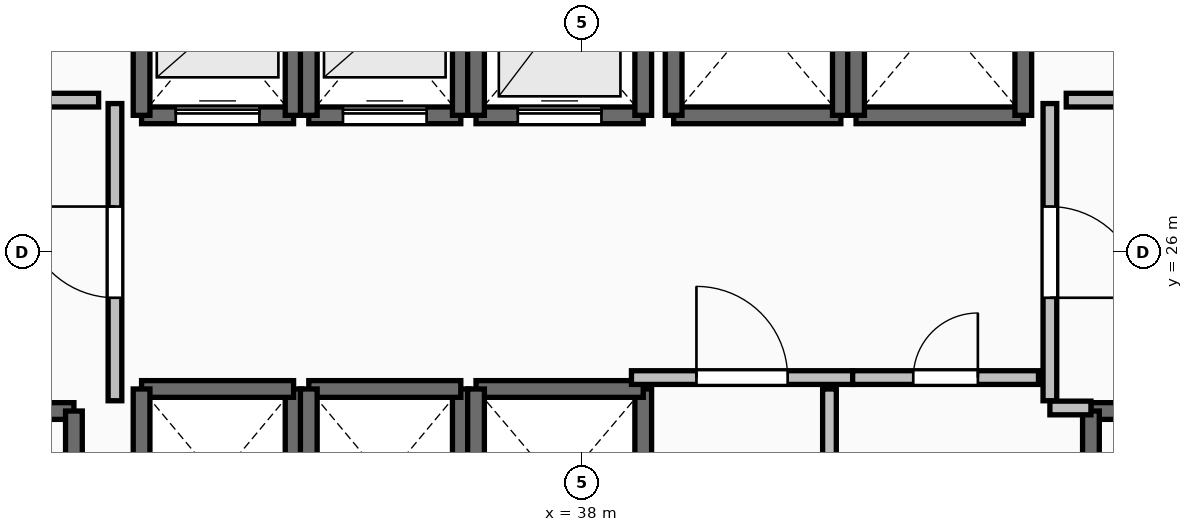
"""IFC4 building model, lengths in metres.
Left out: names, types, materials, properties, quantities, classifications, styles, units other than length and angle.
Written with IfcOpenShell. Run it as: python <this file> out.ifc"""

import sys

from ifc_helpers import new_model, si_unit, direction, frame, frame_2d, origin, place, context, subcontext, project, spatial, rectangle, extrude, element, fill, save


model = new_model("IFC4")
c1 = context("Model", 3, precision=1e-05, world=origin(), true_north=direction((0.0, 1.0)))
c2 = subcontext(c1, "Body", "Model", "MODEL_VIEW")
j1 = project(units=[si_unit("LENGTHUNIT", "METRE"), si_unit("PLANEANGLEUNIT", "RADIAN")], contexts=[c1])
p1 = place(None, origin())
s1 = spatial("IfcSite", under=j1, at=p1, CompositionType="ELEMENT")
p2 = place(p1, origin())
s2 = spatial("IfcBuilding", under=s1, at=p2, CompositionType="ELEMENT")
p3 = place(p2, frame((0.0, 0.0, 38.0)))
s3 = spatial("IfcBuildingStorey", under=s2, at=p3, CompositionType="ELEMENT", Elevation=38.0)
p4 = place(p3, frame((27.94, 23.91, 0.0), z_axis=(0.0, 0.0, 1.0), x_axis=(1.0, 0.0, 0.0)))
e1 = element("IfcWall", 1, at=p4, inside=s3, PredefinedType="SOLIDWALL", context=c2, shape_type="SweptSolid", body=[
    extrude(rectangle(XDim=3.37, YDim=0.22, at=frame_2d((1.685, 0.0))), origin(), (0.0, 0.0, 1.0), 3.24),
])
p5 = place(p4, frame((1.135, 0.0, 0.0)))
e2 = element("IfcOpeningElement", 2, at=p5, cuts=e1, PredefinedType="OPENING", context=c2, shape_type="SweptSolid", body=[
    extrude(rectangle(XDim=1.1, YDim=2.15, at=frame_2d((0.55, 1.075))), frame((0.0, 0.125, 0.0), z_axis=(0.0, -1.0, 0.0), x_axis=(1.0, 0.0, 0.0)), (0.0, 0.0, 1.0), 0.25),
])
p6 = place(p3, frame((31.31, 23.91, 0.0), z_axis=(0.0, 0.0, 1.0), x_axis=(0.0, -1.0, 0.0)))
e3 = element("IfcWall", 3, at=p6, inside=s3, PredefinedType="SOLIDWALL", context=c2, shape_type="SweptSolid", body=[
    extrude(rectangle(XDim=7.42, YDim=0.22, at=frame_2d((3.71, 0.0))), origin(), (0.0, 0.0, 1.0), 3.24),
])
p7 = place(p3, frame((44.69, 23.91, 0.0), z_axis=(0.0, 0.0, 1.0), x_axis=(1.0, 0.0, 0.0)))
e4 = element("IfcWall", 4, at=p7, inside=s3, PredefinedType="SOLIDWALL", context=c2, shape_type="SweptSolid", body=[
    extrude(rectangle(XDim=3.37, YDim=0.22, at=frame_2d((1.685, 0.0))), origin(), (0.0, 0.0, 1.0), 3.24),
])
p8 = place(p7, frame((1.135, 0.0, 0.0)))
e5 = element("IfcOpeningElement", 5, at=p8, cuts=e4, PredefinedType="OPENING", context=c2, shape_type="SweptSolid", body=[
    extrude(rectangle(XDim=1.1, YDim=2.15, at=frame_2d((0.55, 1.075))), frame((0.0, 0.125, 0.0), z_axis=(0.0, -1.0, 0.0), x_axis=(1.0, 0.0, 0.0)), (0.0, 0.0, 1.0), 0.25),
])
p9 = place(p3, frame((44.69, 16.49, 0.0), z_axis=(0.0, 0.0, 1.0), x_axis=(0.0, 1.0, 0.0)))
e6 = element("IfcWall", 6, at=p9, inside=s3, PredefinedType="SOLIDWALL", context=c2, shape_type="SweptSolid", body=[
    extrude(rectangle(XDim=7.42, YDim=0.22, at=frame_2d((3.71, 0.0))), origin(), (0.0, 0.0, 1.0), 3.24),
])
p10 = place(p3, frame((32.2, 27.8, 0.0), z_axis=(0.0, 0.0, 1.0), x_axis=(1.0, 0.0, 0.0)))
e7 = element("IfcWall", 7, at=p10, inside=s3, PredefinedType="SOLIDWALL", context=c2, shape_type="SweptSolid", body=[
    extrude(rectangle(XDim=2.0, YDim=0.22, at=frame_2d((1.0, 0.0))), origin(), (0.0, 0.0, 1.0), 3.24),
])
p11 = place(p10, frame((0.45, 0.0, 0.0)))
e8 = element("IfcOpeningElement", 8, at=p11, cuts=e7, PredefinedType="OPENING", context=c2, shape_type="SweptSolid", body=[
    extrude(rectangle(XDim=1.1, YDim=2.2, at=frame_2d((0.55, 1.1))), frame((0.0, 0.125, 0.0), z_axis=(0.0, -1.0, 0.0), x_axis=(1.0, 0.0, 0.0)), (0.0, 0.0, 1.0), 0.25),
])
for number, where, z_axis, x_axis in (
    (9, (34.2, 27.8, 0.0), (0.0, 0.0, 1.0), (0.0, 1.0, 0.0)),
    (10, (32.2, 30.2, 0.0), (0.0, 0.0, 1.0), (0.0, -1.0, 0.0)),
):
    element("IfcWall", number, at=place(p3, frame(where, z_axis=z_axis, x_axis=x_axis)), inside=s3, PredefinedType="SOLIDWALL", context=c2, shape_type="SweptSolid", body=[
        extrude(rectangle(XDim=2.4, YDim=0.22, at=frame_2d((1.2, 0.0))), origin(), (0.0, 0.0, 1.0), 3.24),
    ])
p12 = place(p3, frame((34.4, 27.8, 0.0), z_axis=(0.0, 0.0, 1.0), x_axis=(1.0, 0.0, 0.0)))
e11 = element("IfcWall", 11, at=p12, inside=s3, PredefinedType="SOLIDWALL", context=c2, shape_type="SweptSolid", body=[
    extrude(rectangle(XDim=2.0, YDim=0.22, at=frame_2d((1.0, 0.0))), origin(), (0.0, 0.0, 1.0), 3.24),
])
p13 = place(p12, frame((0.45, 0.0, 0.0)))
e12 = element("IfcOpeningElement", 12, at=p13, cuts=e11, PredefinedType="OPENING", context=c2, shape_type="SweptSolid", body=[
    extrude(rectangle(XDim=1.1, YDim=2.2, at=frame_2d((0.55, 1.1))), frame((0.0, 0.125, 0.0), z_axis=(0.0, -1.0, 0.0), x_axis=(1.0, 0.0, 0.0)), (0.0, 0.0, 1.0), 0.25),
])
for number, where, z_axis, x_axis in (
    (13, (36.4, 27.8, 0.0), (0.0, 0.0, 1.0), (0.0, 1.0, 0.0)),
    (14, (34.4, 30.2, 0.0), (0.0, 0.0, 1.0), (0.0, -1.0, 0.0)),
):
    element("IfcWall", number, at=place(p3, frame(where, z_axis=z_axis, x_axis=x_axis)), inside=s3, PredefinedType="SOLIDWALL", context=c2, shape_type="SweptSolid", body=[
        extrude(rectangle(XDim=2.4, YDim=0.22, at=frame_2d((1.2, 0.0))), origin(), (0.0, 0.0, 1.0), 3.24),
    ])
p14 = place(p3, frame((36.6, 27.8, 0.0), z_axis=(0.0, 0.0, 1.0), x_axis=(1.0, 0.0, 0.0)))
e15 = element("IfcWall", 15, at=p14, inside=s3, PredefinedType="SOLIDWALL", context=c2, shape_type="SweptSolid", body=[
    extrude(rectangle(XDim=2.2, YDim=0.22, at=frame_2d((1.1, 0.0))), origin(), (0.0, 0.0, 1.0), 3.24),
])
p15 = place(p14, frame((0.55, 0.0, 0.0)))
e16 = element("IfcOpeningElement", 16, at=p15, cuts=e15, PredefinedType="OPENING", context=c2, shape_type="SweptSolid", body=[
    extrude(rectangle(XDim=1.1, YDim=2.2, at=frame_2d((0.55, 1.1))), frame((0.0, 0.125, 0.0), z_axis=(0.0, -1.0, 0.0), x_axis=(1.0, 0.0, 0.0)), (0.0, 0.0, 1.0), 0.25),
])
for number, where, z_axis, x_axis in (
    (17, (38.8, 27.8, 0.0), (0.0, 0.0, 1.0), (0.0, 1.0, 0.0)),
    (18, (36.6, 30.4, 0.0), (0.0, 0.0, 1.0), (0.0, -1.0, 0.0)),
):
    element("IfcWall", number, at=place(p3, frame(where, z_axis=z_axis, x_axis=x_axis)), inside=s3, PredefinedType="SOLIDWALL", context=c2, shape_type="SweptSolid", body=[
        extrude(rectangle(XDim=2.6, YDim=0.22, at=frame_2d((1.3, 0.0))), origin(), (0.0, 0.0, 1.0), 3.24),
    ])
p16 = place(p3, frame((34.2, 21.8, 0.0), z_axis=(0.0, 0.0, 1.0), x_axis=(0.0, 1.0, 0.0)))
e19 = element("IfcWall", 19, at=p16, inside=s3, PredefinedType="SOLIDWALL", context=c2, shape_type="SweptSolid", body=[
    extrude(rectangle(XDim=2.4, YDim=0.22, at=frame_2d((1.2, 0.0))), origin(), (0.0, 0.0, 1.0), 3.24),
])
p17 = place(p3, frame((34.2, 24.2, 0.0), z_axis=(0.0, 0.0, 1.0), x_axis=(-1.0, 0.0, 0.0)))
e20 = element("IfcWall", 20, at=p17, inside=s3, PredefinedType="SOLIDWALL", context=c2, shape_type="SweptSolid", body=[
    extrude(rectangle(XDim=2.0, YDim=0.22, at=frame_2d((1.0, 0.0))), origin(), (0.0, 0.0, 1.0), 3.24),
])
for number, where, z_axis, x_axis in (
    (21, (32.2, 24.2, 0.0), (0.0, 0.0, 1.0), (0.0, -1.0, 0.0)),
    (22, (36.4, 21.8, 0.0), (0.0, 0.0, 1.0), (0.0, 1.0, 0.0)),
):
    element("IfcWall", number, at=place(p3, frame(where, z_axis=z_axis, x_axis=x_axis)), inside=s3, PredefinedType="SOLIDWALL", context=c2, shape_type="SweptSolid", body=[
        extrude(rectangle(XDim=2.4, YDim=0.22, at=frame_2d((1.2, 0.0))), origin(), (0.0, 0.0, 1.0), 3.24),
    ])
p18 = place(p3, frame((36.4, 24.2, 0.0), z_axis=(0.0, 0.0, 1.0), x_axis=(-1.0, 0.0, 0.0)))
e23 = element("IfcWall", 23, at=p18, inside=s3, PredefinedType="SOLIDWALL", context=c2, shape_type="SweptSolid", body=[
    extrude(rectangle(XDim=2.0, YDim=0.22, at=frame_2d((1.0, 0.0))), origin(), (0.0, 0.0, 1.0), 3.24),
])
p19 = place(p3, frame((34.4, 24.2, 0.0), z_axis=(0.0, 0.0, 1.0), x_axis=(0.0, -1.0, 0.0)))
e24 = element("IfcWall", 24, at=p19, inside=s3, PredefinedType="SOLIDWALL", context=c2, shape_type="SweptSolid", body=[
    extrude(rectangle(XDim=2.4, YDim=0.22, at=frame_2d((1.2, 0.0))), origin(), (0.0, 0.0, 1.0), 3.24),
])
p20 = place(p3, frame((38.8, 21.6, 0.0), z_axis=(0.0, 0.0, 1.0), x_axis=(0.0, 1.0, 0.0)))
e25 = element("IfcWall", 25, at=p20, inside=s3, PredefinedType="SOLIDWALL", context=c2, shape_type="SweptSolid", body=[
    extrude(rectangle(XDim=2.6, YDim=0.22, at=frame_2d((1.3, 0.0))), origin(), (0.0, 0.0, 1.0), 3.24),
])
p21 = place(p3, frame((38.8, 24.2, 0.0), z_axis=(0.0, 0.0, 1.0), x_axis=(-1.0, 0.0, 0.0)))
e26 = element("IfcWall", 26, at=p21, inside=s3, PredefinedType="SOLIDWALL", context=c2, shape_type="SweptSolid", body=[
    extrude(rectangle(XDim=2.2, YDim=0.22, at=frame_2d((1.1, 0.0))), origin(), (0.0, 0.0, 1.0), 3.24),
])
p22 = place(p3, frame((36.6, 24.2, 0.0), z_axis=(0.0, 0.0, 1.0), x_axis=(0.0, -1.0, 0.0)))
e27 = element("IfcWall", 27, at=p22, inside=s3, PredefinedType="SOLIDWALL", context=c2, shape_type="SweptSolid", body=[
    extrude(rectangle(XDim=2.6, YDim=0.22, at=frame_2d((1.3, 0.0))), origin(), (0.0, 0.0, 1.0), 3.24),
])
p23 = place(p3, frame((39.2, 27.8, 0.0), z_axis=(0.0, 0.0, 1.0), x_axis=(1.0, 0.0, 0.0)))
e28 = element("IfcWall", 28, at=p23, inside=s3, PredefinedType="SOLIDWALL", context=c2, shape_type="SweptSolid", body=[
    extrude(rectangle(XDim=2.2, YDim=0.22, at=frame_2d((1.1, 0.0))), origin(), (0.0, 0.0, 1.0), 3.24),
])
for number, where, z_axis, x_axis in (
    (29, (41.4, 27.8, 0.0), (0.0, 0.0, 1.0), (0.0, 1.0, 0.0)),
    (30, (39.2, 30.4, 0.0), (0.0, 0.0, 1.0), (0.0, -1.0, 0.0)),
):
    element("IfcWall", number, at=place(p3, frame(where, z_axis=z_axis, x_axis=x_axis)), inside=s3, PredefinedType="SOLIDWALL", context=c2, shape_type="SweptSolid", body=[
        extrude(rectangle(XDim=2.6, YDim=0.22, at=frame_2d((1.3, 0.0))), origin(), (0.0, 0.0, 1.0), 3.24),
    ])
p24 = place(p3, frame((41.6, 27.8, 0.0), z_axis=(0.0, 0.0, 1.0), x_axis=(1.0, 0.0, 0.0)))
e31 = element("IfcWall", 31, at=p24, inside=s3, PredefinedType="SOLIDWALL", context=c2, shape_type="SweptSolid", body=[
    extrude(rectangle(XDim=2.2, YDim=0.22, at=frame_2d((1.1, 0.0))), origin(), (0.0, 0.0, 1.0), 3.24),
])
for number, where, z_axis, x_axis in (
    (32, (43.8, 27.8, 0.0), (0.0, 0.0, 1.0), (0.0, 1.0, 0.0)),
    (33, (41.6, 30.4, 0.0), (0.0, 0.0, 1.0), (0.0, -1.0, 0.0)),
):
    element("IfcWall", number, at=place(p3, frame(where, z_axis=z_axis, x_axis=x_axis)), inside=s3, PredefinedType="SOLIDWALL", context=c2, shape_type="SweptSolid", body=[
        extrude(rectangle(XDim=2.6, YDim=0.22, at=frame_2d((1.3, 0.0))), origin(), (0.0, 0.0, 1.0), 3.24),
    ])
p25 = place(p3, frame((31.85, 24.045, 0.0), z_axis=(0.0, 0.0, 1.0), x_axis=(0.0, 1.0, 0.0)))
e34 = element("IfcWall", 34, at=p25, inside=s3, PredefinedType="PARTITIONING", context=c2, shape_type="SweptSolid", body=[
    extrude(rectangle(XDim=3.91, YDim=0.18, at=frame_2d((1.955, 0.0))), origin(), (0.0, 0.0, 1.0), 3.24),
])
p26 = place(p25, frame((1.355, 0.0, 0.0)))
e35 = element("IfcOpeningElement", 35, at=p26, cuts=e34, PredefinedType="OPENING", context=c2, shape_type="SweptSolid", body=[
    extrude(rectangle(XDim=1.2, YDim=2.15, at=frame_2d((0.6, 1.075))), frame((0.0, 0.105, 0.0), z_axis=(0.0, -1.0, 0.0), x_axis=(1.0, 0.0, 0.0)), (0.0, 0.0, 1.0), 0.21),
])
p27 = place(p3, frame((44.15, 27.955, 0.0), z_axis=(0.0, 0.0, 1.0), x_axis=(0.0, -1.0, 0.0)))
e36 = element("IfcWall", 36, at=p27, inside=s3, PredefinedType="PARTITIONING", context=c2, shape_type="SweptSolid", body=[
    extrude(rectangle(XDim=3.91, YDim=0.18, at=frame_2d((1.955, 0.0))), origin(), (0.0, 0.0, 1.0), 3.24),
])
p28 = place(p27, frame((1.355, 0.0, 0.0)))
e37 = element("IfcOpeningElement", 37, at=p28, cuts=e36, PredefinedType="OPENING", context=c2, shape_type="SweptSolid", body=[
    extrude(rectangle(XDim=1.2, YDim=2.15, at=frame_2d((0.6, 1.075))), frame((0.0, 0.105, 0.0), z_axis=(0.0, -1.0, 0.0), x_axis=(1.0, 0.0, 0.0)), (0.0, 0.0, 1.0), 0.21),
])
p29 = place(p3, frame((44.15, 23.95, 0.0), z_axis=(0.0, 0.0, 1.0), x_axis=(1.0, 0.0, 0.0)))
e38 = element("IfcWall", 38, at=p29, inside=s3, PredefinedType="PARTITIONING", context=c2, shape_type="SweptSolid", body=[
    extrude(rectangle(XDim=0.54, YDim=0.18, at=frame_2d((0.27, 0.0))), origin(), (0.0, 0.0, 1.0), 3.24),
])
p30 = place(p3, frame((38.645, 24.35, 0.0), z_axis=(0.0, 0.0, 1.0), x_axis=(1.0, 0.0, 0.0)))
e39 = element("IfcWall", 39, at=p30, inside=s3, PredefinedType="PARTITIONING", context=c2, shape_type="SweptSolid", body=[
    extrude(rectangle(XDim=2.91, YDim=0.18, at=frame_2d((1.455, 0.0))), origin(), (0.0, 0.0, 1.0), 3.24),
])
p31 = place(p30, frame((0.855, 0.0, 0.0)))
e40 = element("IfcOpeningElement", 40, at=p31, cuts=e39, PredefinedType="OPENING", context=c2, shape_type="SweptSolid", body=[
    extrude(rectangle(XDim=1.2, YDim=2.15, at=frame_2d((0.6, 1.075))), frame((0.0, 0.105, 0.0), z_axis=(0.0, -1.0, 0.0), x_axis=(1.0, 0.0, 0.0)), (0.0, 0.0, 1.0), 0.21),
])
p32 = place(p3, frame((41.555, 24.35, 0.0), z_axis=(0.0, 0.0, 1.0), x_axis=(1.0, 0.0, 0.0)))
e41 = element("IfcWall", 41, at=p32, inside=s3, PredefinedType="PARTITIONING", context=c2, shape_type="SweptSolid", body=[
    extrude(rectangle(XDim=2.445, YDim=0.18, at=frame_2d((1.223, 0.0))), origin(), (0.0, 0.0, 1.0), 3.24),
])
p33 = place(p32, frame((0.798, 0.0, 0.0)))
e42 = element("IfcOpeningElement", 42, at=p33, cuts=e41, PredefinedType="OPENING", context=c2, shape_type="SweptSolid", body=[
    extrude(rectangle(XDim=0.85, YDim=2.1, at=frame_2d((0.425, 1.05))), frame((0.0, 0.105, 0.0), z_axis=(0.0, -1.0, 0.0), x_axis=(1.0, 0.0, 0.0)), (0.0, 0.0, 1.0), 0.21),
])
p34 = place(p3, frame((41.25, 20.305, 0.0), z_axis=(0.0, 0.0, 1.0), x_axis=(0.0, 1.0, 0.0)))
e43 = element("IfcWall", 43, at=p34, inside=s3, PredefinedType="PARTITIONING", context=c2, shape_type="SweptSolid", body=[
    extrude(rectangle(XDim=3.895, YDim=0.18, at=frame_2d((1.948, 0.0))), origin(), (0.0, 0.0, 1.0), 3.24),
])
p35 = place(p34, frame((1.522, 0.0, 0.0)))
e44 = element("IfcOpeningElement", 44, at=p35, cuts=e43, PredefinedType="OPENING", context=c2, shape_type="SweptSolid", body=[
    extrude(rectangle(XDim=0.85, YDim=2.1, at=frame_2d((0.425, 1.05))), frame((0.0, 0.105, 0.0), z_axis=(0.0, -1.0, 0.0), x_axis=(1.0, 0.0, 0.0)), (0.0, 0.0, 1.0), 0.21),
])
for number, where, z_axis, x_axis in (
    (45, (31.635, 28.0, 0.0), (0.0, 0.0, 1.0), (-1.0, 0.0, 0.0)),
    (46, (45.28, 28.0, 0.0), (0.0, 0.0, 1.0), (-1.0, 0.0, 0.0)),
):
    element("IfcWall", number, at=place(p3, frame(where, z_axis=z_axis, x_axis=x_axis)), inside=s3, PredefinedType="PARTITIONING", context=c2, shape_type="SweptSolid", body=[
        extrude(rectangle(XDim=0.915, YDim=0.18, at=frame_2d((0.458, 0.0))), origin(), (0.0, 0.0, 1.0), 3.24),
    ])
p36 = place(p11, origin())
e47 = element("IfcDoor", 47, at=p36, inside=s3, OperationType="SLIDING_TO_LEFT", PredefinedType="DOOR", context=c2, shape_type="SweptSolid", body=[
    extrude(rectangle(XDim=1.1, YDim=2.2, at=frame_2d((0.55, 1.1))), frame((0.0, 0.025, 0.0), z_axis=(0.0, -1.0, 0.0), x_axis=(1.0, 0.0, 0.0)), (0.0, 0.0, 1.0), 0.05),
])
fill(e8, e47)
p37 = place(p13, origin())
e48 = element("IfcDoor", 48, at=p37, inside=s3, OperationType="SLIDING_TO_LEFT", PredefinedType="DOOR", context=c2, shape_type="SweptSolid", body=[
    extrude(rectangle(XDim=1.1, YDim=2.2, at=frame_2d((0.55, 1.1))), frame((0.0, 0.025, 0.0), z_axis=(0.0, -1.0, 0.0), x_axis=(1.0, 0.0, 0.0)), (0.0, 0.0, 1.0), 0.05),
])
fill(e12, e48)
p38 = place(p15, origin())
e49 = element("IfcDoor", 49, at=p38, inside=s3, OperationType="SLIDING_TO_LEFT", PredefinedType="DOOR", context=c2, shape_type="SweptSolid", body=[
    extrude(rectangle(XDim=1.1, YDim=2.2, at=frame_2d((0.55, 1.1))), frame((0.0, 0.025, 0.0), z_axis=(0.0, -1.0, 0.0), x_axis=(1.0, 0.0, 0.0)), (0.0, 0.0, 1.0), 0.05),
])
fill(e16, e49)
p39 = place(p26, origin())
e50 = element("IfcDoor", 50, at=p39, inside=s3, OperationType="SINGLE_SWING_RIGHT", PredefinedType="DOOR", context=c2, shape_type="SweptSolid", body=[
    extrude(rectangle(XDim=1.2, YDim=2.15, at=frame_2d((0.6, 1.075))), frame((0.0, 0.025, 0.0), z_axis=(0.0, -1.0, 0.0), x_axis=(1.0, 0.0, 0.0)), (0.0, 0.0, 1.0), 0.05),
])
fill(e35, e50)
p40 = place(p28, origin())
e51 = element("IfcDoor", 51, at=p40, inside=s3, OperationType="SINGLE_SWING_RIGHT", PredefinedType="DOOR", context=c2, shape_type="SweptSolid", body=[
    extrude(rectangle(XDim=1.2, YDim=2.15, at=frame_2d((0.6, 1.075))), frame((0.0, 0.025, 0.0), z_axis=(0.0, -1.0, 0.0), x_axis=(1.0, 0.0, 0.0)), (0.0, 0.0, 1.0), 0.05),
])
fill(e37, e51)
p41 = place(p31, origin())
e52 = element("IfcDoor", 52, at=p41, inside=s3, OperationType="SINGLE_SWING_LEFT", PredefinedType="DOOR", context=c2, shape_type="SweptSolid", body=[
    extrude(rectangle(XDim=1.2, YDim=2.15, at=frame_2d((0.6, 1.075))), frame((0.0, 0.025, 0.0), z_axis=(0.0, -1.0, 0.0), x_axis=(1.0, 0.0, 0.0)), (0.0, 0.0, 1.0), 0.05),
])
fill(e40, e52)
p42 = place(p33, origin())
e53 = element("IfcDoor", 53, at=p42, inside=s3, OperationType="SINGLE_SWING_RIGHT", PredefinedType="DOOR", context=c2, shape_type="SweptSolid", body=[
    extrude(rectangle(XDim=0.85, YDim=2.1, at=frame_2d((0.425, 1.05))), frame((0.0, 0.025, 0.0), z_axis=(0.0, -1.0, 0.0), x_axis=(1.0, 0.0, 0.0)), (0.0, 0.0, 1.0), 0.05),
])
fill(e42, e53)
save(model, sys.argv[1])
